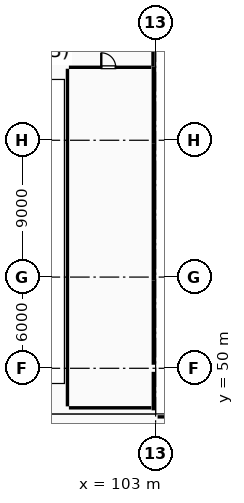
"""IFC4 building model, lengths in metres.
Left out: names, types, materials, properties, quantities, classifications, styles, units other than length and angle.
Written with IfcOpenShell. Run it as: python <this file> out.ifc"""

import sys

from ifc_helpers import new_model, si_unit, direction, frame, frame_2d, origin, origin_2d, place, context, subcontext, project, spatial, rectangle, hollow_rectangle, i_section, extrude, element, fill, save


model = new_model("IFC4")
c1 = context("Model", 3, precision=1e-05, world=origin(), true_north=direction((0.0, 1.0)))
c2 = subcontext(c1, "Body", "Model", "MODEL_VIEW")
j1 = project(units=[si_unit("LENGTHUNIT", "METRE"), si_unit("PLANEANGLEUNIT", "RADIAN")], contexts=[c1])
p1 = place(None, origin())
s1 = spatial("IfcSite", under=j1, at=p1, CompositionType="ELEMENT")
p2 = place(p1, origin())
s2 = spatial("IfcBuilding", under=s1, at=p2, CompositionType="ELEMENT")
p3 = place(p2, frame((0.0, 0.0, 10.2)))
s3 = spatial("IfcBuildingStorey", under=s2, at=p3, CompositionType="ELEMENT", Elevation=10.2)
p4 = place(p3, frame((103.0, 50.0, 0.0), z_axis=(0.0, 0.0, 1.0), x_axis=(1.0, 0.0, 0.0)))
e1 = element("IfcColumn", 1, at=p4, inside=s3, PredefinedType="COLUMN", context=c2, shape_type="SweptSolid", body=[
    extrude(hollow_rectangle(XDim=0.45, YDim=0.45, WallThickness=0.02, at=origin_2d()), origin(), (0.0, 0.0, 1.0), 4.8),
])
for number, where, z_axis, x_axis in (
    (2, (103.0, 56.0, 0.0), (0.0, 0.0, 1.0), (1.0, 0.0, 0.0)),
    (3, (103.0, 65.0, 0.0), (0.0, 0.0, 1.0), (1.0, 0.0, 0.0)),
    (4, (103.0, 47.0, 0.0), (0.0, 0.0, 1.0), (1.0, 0.0, 0.0)),
):
    element("IfcColumn", number, at=place(p3, frame(where, z_axis=z_axis, x_axis=x_axis)), inside=s3, PredefinedType="COLUMN", context=c2, shape_type="SweptSolid", body=[
        extrude(i_section(OverallWidth=0.25, OverallDepth=0.45, WebThickness=0.011, FlangeThickness=0.014, FilletRadius=0.015, at=origin_2d()), origin(), (0.0, 0.0, 1.0), 4.8),
    ])
p5 = place(p3, frame((102.83, 73.767, 0.0), z_axis=(0.0, 0.0, 1.0), x_axis=(0.0, -1.0, 0.0)))
e5 = element("IfcWall", 5, at=p5, inside=s3, PredefinedType="STANDARD", context=c2, shape_type="SweptSolid", body=[
    extrude(rectangle(XDim=3.903, YDim=0.3, at=frame_2d((1.952, 0.0))), origin(), (0.0, 0.0, 1.0), 3.975),
])
p6 = place(p3, frame((102.85, 69.86, 0.0), z_axis=(0.0, 0.0, 1.0), x_axis=(0.0, -1.0, 0.0)))
e6 = element("IfcWall", 6, at=p6, inside=s3, PredefinedType="ELEMENTEDWALL", context=c2, shape_type="SweptSolid", body=[
    extrude(rectangle(XDim=5.093, YDim=0.26, at=frame_2d((2.546, 0.0))), origin(), (0.0, 0.0, 1.0), 3.975),
])
p7 = place(p3, frame((102.85, 64.767, 0.0), z_axis=(0.0, 0.0, 1.0), x_axis=(0.0, -1.0, 0.0)))
e7 = element("IfcWall", 7, at=p7, inside=s3, PredefinedType="ELEMENTEDWALL", context=c2, shape_type="SweptSolid", body=[
    extrude(rectangle(XDim=9.0, YDim=0.26, at=frame_2d((4.5, 0.0))), origin(), (0.0, 0.0, 1.0), 3.925),
])
p8 = place(p3, frame((102.85, 55.767, 0.0), z_axis=(0.0, 0.0, 1.0), x_axis=(0.0, -1.0, 0.0)))
e8 = element("IfcWall", 8, at=p8, inside=s3, PredefinedType="ELEMENTEDWALL", context=c2, shape_type="SweptSolid", body=[
    extrude(rectangle(XDim=5.534, YDim=0.26, at=frame_2d((2.767, 0.0))), origin(), (0.0, 0.0, 1.0), 4.225),
])
p9 = place(p3, frame((102.85, 49.767, 0.0), z_axis=(0.0, 0.0, 1.0), x_axis=(0.0, -1.0, 0.0)))
e9 = element("IfcWall", 9, at=p9, inside=s3, PredefinedType="ELEMENTEDWALL", context=c2, shape_type="SweptSolid", body=[
    extrude(rectangle(XDim=2.534, YDim=0.26, at=frame_2d((1.267, 0.0))), origin(), (0.0, 0.0, 1.0), 4.175),
])
p10 = place(p3, frame((103.129, 46.805, 0.0), z_axis=(0.0, 0.0, 1.0), x_axis=(1.0, 0.0, 0.0)))
e10 = element("IfcWall", 10, at=p10, inside=s3, PredefinedType="STANDARD", context=c2, shape_type="SweptSolid", body=[
    extrude(rectangle(XDim=15.286, YDim=0.35, at=frame_2d((7.643, 0.0))), origin(), (0.0, 0.0, 1.0), 3.725),
])
p11 = place(p3, frame((97.295, 69.8, 0.0), z_axis=(0.0, 0.0, 1.0), x_axis=(1.0, 0.0, 0.0)))
e11 = element("IfcWall", 11, at=p11, inside=s3, PredefinedType="PARTITIONING", context=c2, shape_type="SweptSolid", body=[
    extrude(rectangle(XDim=5.421, YDim=0.15, at=frame_2d((2.71, 0.0))), origin(), (0.0, 0.0, 1.0), 4.53),
])
p12 = place(p11, frame((2.13, 0.0, 0.0)))
e12 = element("IfcOpeningElement", 12, at=p12, cuts=e11, PredefinedType="OPENING", context=c2, shape_type="SweptSolid", body=[
    extrude(rectangle(XDim=0.95, YDim=2.15, at=frame_2d((0.475, 1.075))), frame((0.0, 0.085, 0.0), z_axis=(0.0, -1.0, 0.0), x_axis=(1.0, 0.0, 0.0)), (0.0, 0.0, 1.0), 0.17),
])
p13 = place(p3, frame((102.716, 47.4, 0.0), z_axis=(0.0, 0.0, 1.0), x_axis=(-1.0, 0.0, 0.0)))
e13 = element("IfcWall", 13, at=p13, inside=s3, PredefinedType="PARTITIONING", context=c2, shape_type="SweptSolid", body=[
    extrude(rectangle(XDim=5.421, YDim=0.15, at=frame_2d((2.71, 0.0))), origin(), (0.0, 0.0, 1.0), 3.72),
])
p14 = place(p3, frame((97.2, 47.495, 0.0), z_axis=(0.0, 0.0, 1.0), x_axis=(0.0, 1.0, 0.0)))
e14 = element("IfcWall", 14, at=p14, inside=s3, PredefinedType="PARTITIONING", context=c2, shape_type="SweptSolid", body=[
    extrude(rectangle(XDim=22.21, YDim=0.15, at=frame_2d((11.105, 0.0))), origin(), (0.0, 0.0, 1.0), 4.53),
])
p15 = place(p12, origin())
e15 = element("IfcDoor", 15, at=p15, inside=s3, OperationType="SINGLE_SWING_LEFT", PredefinedType="DOOR", context=c2, shape_type="SweptSolid", body=[
    extrude(rectangle(XDim=0.95, YDim=2.15, at=frame_2d((0.475, 1.075))), frame((0.0, 0.025, 0.0), z_axis=(0.0, -1.0, 0.0), x_axis=(1.0, 0.0, 0.0)), (0.0, 0.0, 1.0), 0.05),
])
fill(e12, e15)
save(model, sys.argv[1])
